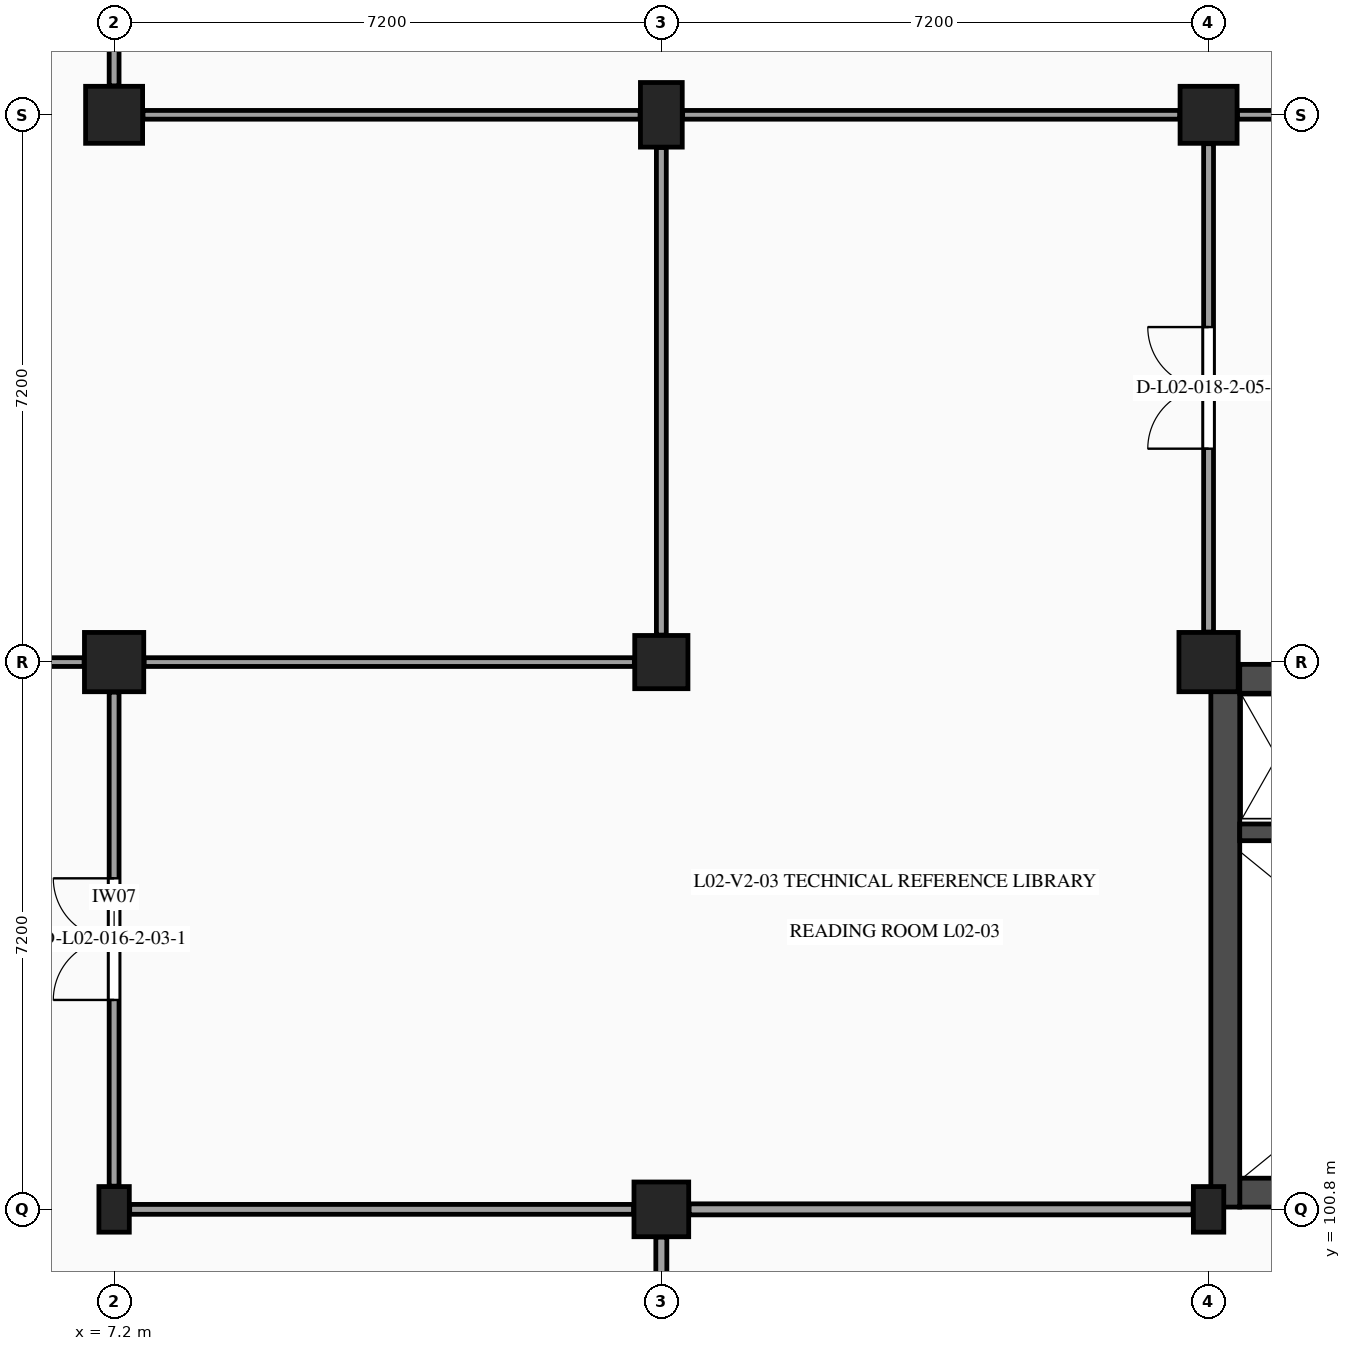
"""IFC4 building model, lengths in metres.
Left out: names, types, materials, properties, quantities, classifications, styles, units other than length and angle.
Written with IfcOpenShell. Run it as: python <this file> out.ifc"""

import sys

from ifc_helpers import new_model, si_unit, direction, frame, frame_2d, origin, origin_2d, place, context, subcontext, project, spatial, rectangle, extrude, element, fill, save


model = new_model("IFC4")
c1 = context("Model", 3, precision=1e-05, world=origin(), true_north=direction((0.0, 1.0)))
c2 = subcontext(c1, "Body", "Model", "MODEL_VIEW")
j1 = project(units=[si_unit("LENGTHUNIT", "METRE"), si_unit("PLANEANGLEUNIT", "RADIAN")], contexts=[c1])
p1 = place(None, origin())
s1 = spatial("IfcSite", under=j1, at=p1, CompositionType="ELEMENT")
p2 = place(p1, origin())
s2 = spatial("IfcBuilding", under=s1, at=p2, CompositionType="ELEMENT")
p3 = place(p2, frame((0.0, 0.0, 9.9)))
s3 = spatial("IfcBuildingStorey", under=s2, at=p3, CompositionType="ELEMENT", Elevation=9.9)
p4 = place(p3, frame((7.2, 100.8, 0.0), z_axis=(0.0, 0.0, 1.0), x_axis=(1.0, 0.0, 0.0)))
e1 = element("IfcColumn", 1, at=p4, inside=s3, PredefinedType="PILASTER", context=c2, shape_type="SweptSolid", body=[
    extrude(rectangle(XDim=0.4, YDim=0.6, at=origin_2d()), origin(), (0.0, 0.0, 1.0), 4.5),
])
p5 = place(p3, frame((7.2, 108.0, 0.0), z_axis=(0.0, 0.0, 1.0), x_axis=(1.0, 0.0, 0.0)))
e2 = element("IfcColumn", 2, at=p5, inside=s3, PredefinedType="COLUMN", context=c2, shape_type="SweptSolid", body=[
    extrude(rectangle(XDim=0.78, YDim=0.78, at=origin_2d()), origin(), (0.0, 0.0, 1.0), 4.5),
])
p6 = place(p3, frame((7.2, 115.2, 0.0), z_axis=(0.0, 0.0, 1.0), x_axis=(1.0, 0.0, 0.0)))
e3 = element("IfcColumn", 3, at=p6, inside=s3, PredefinedType="COLUMN", context=c2, shape_type="SweptSolid", body=[
    extrude(rectangle(XDim=0.75, YDim=0.75, at=origin_2d()), origin(), (0.0, 0.0, 1.0), 4.5),
])
p7 = place(p3, frame((14.4, 100.8, 0.0), z_axis=(0.0, 0.0, 1.0), x_axis=(1.0, 0.0, 0.0)))
e4 = element("IfcColumn", 4, at=p7, inside=s3, PredefinedType="COLUMN", context=c2, shape_type="SweptSolid", body=[
    extrude(rectangle(XDim=0.72, YDim=0.72, at=origin_2d()), origin(), (0.0, 0.0, 1.0), 4.5),
])
p8 = place(p3, frame((14.4, 108.0, 0.0), z_axis=(0.0, 0.0, 1.0), x_axis=(1.0, 0.0, 0.0)))
e5 = element("IfcColumn", 5, at=p8, inside=s3, PredefinedType="COLUMN", context=c2, shape_type="SweptSolid", body=[
    extrude(rectangle(XDim=0.7, YDim=0.7, at=origin_2d()), origin(), (0.0, 0.0, 1.0), 4.5),
])
p9 = place(p3, frame((14.4, 115.2, 0.0), z_axis=(0.0, 0.0, 1.0), x_axis=(1.0, 0.0, 0.0)))
e6 = element("IfcColumn", 6, at=p9, inside=s3, PredefinedType="COLUMN", context=c2, shape_type="SweptSolid", body=[
    extrude(rectangle(XDim=0.55, YDim=0.85, at=origin_2d()), origin(), (0.0, 0.0, 1.0), 4.5),
])
p10 = place(p3, frame((21.6, 100.8, 0.0), z_axis=(0.0, 0.0, 1.0), x_axis=(1.0, 0.0, 0.0)))
e7 = element("IfcColumn", 7, at=p10, inside=s3, PredefinedType="PILASTER", context=c2, shape_type="SweptSolid", body=[
    extrude(rectangle(XDim=0.4, YDim=0.6, at=origin_2d()), origin(), (0.0, 0.0, 1.0), 4.5),
])
p11 = place(p3, frame((21.6, 108.0, 0.0), z_axis=(0.0, 0.0, 1.0), x_axis=(1.0, 0.0, 0.0)))
e8 = element("IfcColumn", 8, at=p11, inside=s3, PredefinedType="COLUMN", context=c2, shape_type="SweptSolid", body=[
    extrude(rectangle(XDim=0.78, YDim=0.78, at=origin_2d()), origin(), (0.0, 0.0, 1.0), 4.5),
])
p12 = place(p3, frame((21.6, 115.2, 0.0), z_axis=(0.0, 0.0, 1.0), x_axis=(1.0, 0.0, 0.0)))
e9 = element("IfcColumn", 9, at=p12, inside=s3, PredefinedType="COLUMN", context=c2, shape_type="SweptSolid", body=[
    extrude(rectangle(XDim=0.75, YDim=0.75, at=origin_2d()), origin(), (0.0, 0.0, 1.0), 4.5),
])
p13 = place(p3, frame((22.01, 101.02, 0.0), z_axis=(0.0, 0.0, 1.0), x_axis=(1.0, 0.0, 0.0)))
e10 = element("IfcWall", 10, at=p13, inside=s3, PredefinedType="SHEAR", context=c2, shape_type="SweptSolid", body=[
    extrude(rectangle(XDim=6.6, YDim=0.38, at=frame_2d((3.3, 0.0))), origin(), (0.0, 0.0, 1.0), 4.225),
])
p14 = place(p3, frame((21.82, 107.97, 0.0), z_axis=(0.0, 0.0, 1.0), x_axis=(0.0, -1.0, 0.0)))
e11 = element("IfcWall", 11, at=p14, inside=s3, PredefinedType="SHEAR", context=c2, shape_type="SweptSolid", body=[
    extrude(rectangle(XDim=7.14, YDim=0.38, at=frame_2d((3.57, 0.0))), origin(), (0.0, 0.0, 1.0), 4.225),
])
p15 = place(p3, frame((22.01, 107.78, 0.0), z_axis=(0.0, 0.0, 1.0), x_axis=(1.0, 0.0, 0.0)))
e12 = element("IfcWall", 12, at=p15, inside=s3, PredefinedType="SHEAR", context=c2, shape_type="SweptSolid", body=[
    extrude(rectangle(XDim=6.6, YDim=0.38, at=frame_2d((3.3, 0.0))), origin(), (0.0, 0.0, 1.0), 4.225),
])
p16 = place(p15, frame((1.42, 0.0, 0.0)))
e13 = element("IfcOpeningElement", 13, at=p16, cuts=e12, PredefinedType="OPENING", context=c2, shape_type="SweptSolid", body=[
    extrude(rectangle(XDim=0.85, YDim=2.1, at=frame_2d((0.425, 1.05))), frame((0.0, 0.2, 0.0), z_axis=(0.0, -1.0, 0.0), x_axis=(1.0, 0.0, 0.0)), (0.0, 0.0, 1.0), 0.4),
])
p17 = place(p15, frame((3.4, 0.0, 0.0)))
e14 = element("IfcOpeningElement", 14, at=p17, cuts=e12, PredefinedType="OPENING", context=c2, shape_type="SweptSolid", body=[
    extrude(rectangle(XDim=0.95, YDim=2.15, at=frame_2d((0.475, 1.075))), frame((0.0, 0.2, 0.0), z_axis=(0.0, -1.0, 0.0), x_axis=(1.0, 0.0, 0.0)), (0.0, 0.0, 1.0), 0.4),
])
p18 = place(p3, frame((22.01, 105.76, 0.0), z_axis=(0.0, 0.0, 1.0), x_axis=(1.0, 0.0, 0.0)))
e15 = element("IfcWall", 15, at=p18, inside=s3, PredefinedType="SHEAR", context=c2, shape_type="SweptSolid", body=[
    extrude(rectangle(XDim=6.6, YDim=0.22, at=frame_2d((3.3, 0.0))), origin(), (0.0, 0.0, 1.0), 4.225),
])
p19 = place(p3, frame((7.2, 101.105, 0.0), z_axis=(0.0, 0.0, 1.0), x_axis=(0.0, 1.0, 0.0)))
e16 = element("IfcWall", 16, at=p19, inside=s3, PredefinedType="PARTITIONING", context=c2, shape_type="SweptSolid", body=[
    extrude(rectangle(XDim=6.5, YDim=0.13, at=frame_2d((3.25, 0.0))), origin(), (0.0, 0.0, 1.0), 3.54),
])
p20 = place(p19, frame((2.45, 0.0, 0.0)))
e17 = element("IfcOpeningElement", 17, at=p20, cuts=e16, PredefinedType="OPENING", context=c2, shape_type="SweptSolid", body=[
    extrude(rectangle(XDim=1.6, YDim=2.2, at=frame_2d((0.8, 1.1))), frame((0.0, 0.075, 0.0), z_axis=(0.0, -1.0, 0.0), x_axis=(1.0, 0.0, 0.0)), (0.0, 0.0, 1.0), 0.15),
])
p21 = place(p3, frame((0.355, 108.0, 0.0), z_axis=(0.0, 0.0, 1.0), x_axis=(1.0, 0.0, 0.0)))
e18 = element("IfcWall", 18, at=p21, inside=s3, PredefinedType="PARTITIONING", context=c2, shape_type="SweptSolid", body=[
    extrude(rectangle(XDim=6.45, YDim=0.115, at=frame_2d((3.225, 0.0))), origin(), (0.0, 0.0, 1.0), 3.485),
])
p22 = place(p21, frame((2.675, 0.0, 0.0)))
e19 = element("IfcOpeningElement", 19, at=p22, cuts=e18, PredefinedType="OPENING", context=c2, shape_type="SweptSolid", body=[
    extrude(rectangle(XDim=1.1, YDim=2.15, at=frame_2d((0.55, 1.075))), frame((0.0, 0.067, 0.0), z_axis=(0.0, -1.0, 0.0), x_axis=(1.0, 0.0, 0.0)), (0.0, 0.0, 1.0), 0.135),
])
p23 = place(p3, frame((7.2, 115.58, 0.0), z_axis=(0.0, 0.0, 1.0), x_axis=(0.0, 1.0, 0.0)))
e20 = element("IfcWall", 20, at=p23, inside=s3, PredefinedType="PARTITIONING", context=c2, shape_type="SweptSolid", body=[
    extrude(rectangle(XDim=6.455, YDim=0.13, at=frame_2d((3.228, 0.0))), origin(), (0.0, 0.0, 1.0), 3.53),
])
p24 = place(p23, frame((2.427, 0.0, 0.0)))
e21 = element("IfcOpeningElement", 21, at=p24, cuts=e20, PredefinedType="OPENING", context=c2, shape_type="SweptSolid", body=[
    extrude(rectangle(XDim=1.6, YDim=2.2, at=frame_2d((0.8, 1.1))), frame((0.0, 0.075, 0.0), z_axis=(0.0, -1.0, 0.0), x_axis=(1.0, 0.0, 0.0)), (0.0, 0.0, 1.0), 0.15),
])
p25 = place(p3, frame((14.4, 93.98, 0.0), z_axis=(0.0, 0.0, 1.0), x_axis=(0.0, 1.0, 0.0)))
e22 = element("IfcWall", 22, at=p25, inside=s3, PredefinedType="PARTITIONING", context=c2, shape_type="SweptSolid", body=[
    extrude(rectangle(XDim=6.455, YDim=0.145, at=frame_2d((3.228, 0.0))), origin(), (0.0, 0.0, 1.0), 3.54),
])
p26 = place(p25, frame((2.587, 0.0, 0.0)))
e23 = element("IfcOpeningElement", 23, at=p26, cuts=e22, PredefinedType="OPENING", context=c2, shape_type="SweptSolid", body=[
    extrude(rectangle(XDim=1.28, YDim=2.24, at=frame_2d((0.64, 1.12))), frame((0.0, 0.083, 0.0), z_axis=(0.0, -1.0, 0.0), x_axis=(1.0, 0.0, 0.0)), (0.0, 0.0, 1.0), 0.165),
])
p27 = place(p3, frame((7.405, 100.8, 0.0), z_axis=(0.0, 0.0, 1.0), x_axis=(1.0, 0.0, 0.0)))
e24 = element("IfcWall", 24, at=p27, inside=s3, PredefinedType="PARTITIONING", context=c2, shape_type="SweptSolid", body=[
    extrude(rectangle(XDim=6.63, YDim=0.13, at=frame_2d((3.315, 0.0))), origin(), (0.0, 0.0, 1.0), 3.5),
])
p28 = place(p3, frame((7.595, 108.0, 0.0), z_axis=(0.0, 0.0, 1.0), x_axis=(1.0, 0.0, 0.0)))
e25 = element("IfcWall", 25, at=p28, inside=s3, PredefinedType="PARTITIONING", context=c2, shape_type="SweptSolid", body=[
    extrude(rectangle(XDim=6.45, YDim=0.115, at=frame_2d((3.225, 0.0))), origin(), (0.0, 0.0, 1.0), 3.5),
])
p29 = place(p3, frame((14.4, 108.355, 0.0), z_axis=(0.0, 0.0, 1.0), x_axis=(0.0, 1.0, 0.0)))
e26 = element("IfcWall", 26, at=p29, inside=s3, PredefinedType="PARTITIONING", context=c2, shape_type="SweptSolid", body=[
    extrude(rectangle(XDim=6.415, YDim=0.13, at=frame_2d((3.208, 0.0))), origin(), (0.0, 0.0, 1.0), 3.535),
])
p30 = place(p3, frame((7.58, 115.2, 0.0), z_axis=(0.0, 0.0, 1.0), x_axis=(1.0, 0.0, 0.0)))
e27 = element("IfcWall", 27, at=p30, inside=s3, PredefinedType="PARTITIONING", context=c2, shape_type="SweptSolid", body=[
    extrude(rectangle(XDim=6.54, YDim=0.115, at=frame_2d((3.27, 0.0))), origin(), (0.0, 0.0, 1.0), 3.5),
])
p31 = place(p3, frame((14.765, 100.8, 0.0), z_axis=(0.0, 0.0, 1.0), x_axis=(1.0, 0.0, 0.0)))
e28 = element("IfcWall", 28, at=p31, inside=s3, PredefinedType="PARTITIONING", context=c2, shape_type="SweptSolid", body=[
    extrude(rectangle(XDim=6.63, YDim=0.145, at=frame_2d((3.315, 0.0))), origin(), (0.0, 0.0, 1.0), 3.505),
])
p32 = place(p3, frame((21.6, 108.395, 0.0), z_axis=(0.0, 0.0, 1.0), x_axis=(0.0, 1.0, 0.0)))
e29 = element("IfcWall", 29, at=p32, inside=s3, PredefinedType="PARTITIONING", context=c2, shape_type="SweptSolid", body=[
    extrude(rectangle(XDim=6.425, YDim=0.13, at=frame_2d((3.212, 0.0))), origin(), (0.0, 0.0, 1.0), 3.535),
])
p33 = place(p32, frame((2.413, 0.0, 0.0)))
e30 = element("IfcOpeningElement", 30, at=p33, cuts=e29, PredefinedType="OPENING", context=c2, shape_type="SweptSolid", body=[
    extrude(rectangle(XDim=1.6, YDim=2.2, at=frame_2d((0.8, 1.1))), frame((0.0, 0.075, 0.0), z_axis=(0.0, -1.0, 0.0), x_axis=(1.0, 0.0, 0.0)), (0.0, 0.0, 1.0), 0.15),
])
p34 = place(p3, frame((14.68, 115.2, 0.0), z_axis=(0.0, 0.0, 1.0), x_axis=(1.0, 0.0, 0.0)))
e31 = element("IfcWall", 31, at=p34, inside=s3, PredefinedType="PARTITIONING", context=c2, shape_type="SweptSolid", body=[
    extrude(rectangle(XDim=6.54, YDim=0.115, at=frame_2d((3.27, 0.0))), origin(), (0.0, 0.0, 1.0), 3.505),
])
p35 = place(p3, frame((21.98, 115.2, 0.0), z_axis=(0.0, 0.0, 1.0), x_axis=(1.0, 0.0, 0.0)))
e32 = element("IfcWall", 32, at=p35, inside=s3, PredefinedType="PARTITIONING", context=c2, shape_type="SweptSolid", body=[
    extrude(rectangle(XDim=6.54, YDim=0.115, at=frame_2d((3.27, 0.0))), origin(), (0.0, 0.0, 1.0), 3.525),
])
p36 = place(p20, origin())
e33 = element("IfcDoor", 33, at=p36, inside=s3, OperationType="DOUBLE_DOOR_SINGLE_SWING", PredefinedType="DOOR", context=c2, shape_type="SweptSolid", body=[
    extrude(rectangle(XDim=1.6, YDim=2.2, at=frame_2d((0.8, 1.1))), frame((0.0, 0.025, 0.0), z_axis=(0.0, -1.0, 0.0), x_axis=(1.0, 0.0, 0.0)), (0.0, 0.0, 1.0), 0.05),
])
fill(e17, e33)
p37 = place(p33, origin())
e34 = element("IfcDoor", 34, at=p37, inside=s3, OperationType="DOUBLE_DOOR_SINGLE_SWING", PredefinedType="DOOR", context=c2, shape_type="SweptSolid", body=[
    extrude(rectangle(XDim=1.6, YDim=2.2, at=frame_2d((0.8, 1.1))), frame((0.0, 0.025, 0.0), z_axis=(0.0, -1.0, 0.0), x_axis=(1.0, 0.0, 0.0)), (0.0, 0.0, 1.0), 0.05),
])
fill(e30, e34)
save(model, sys.argv[1])
